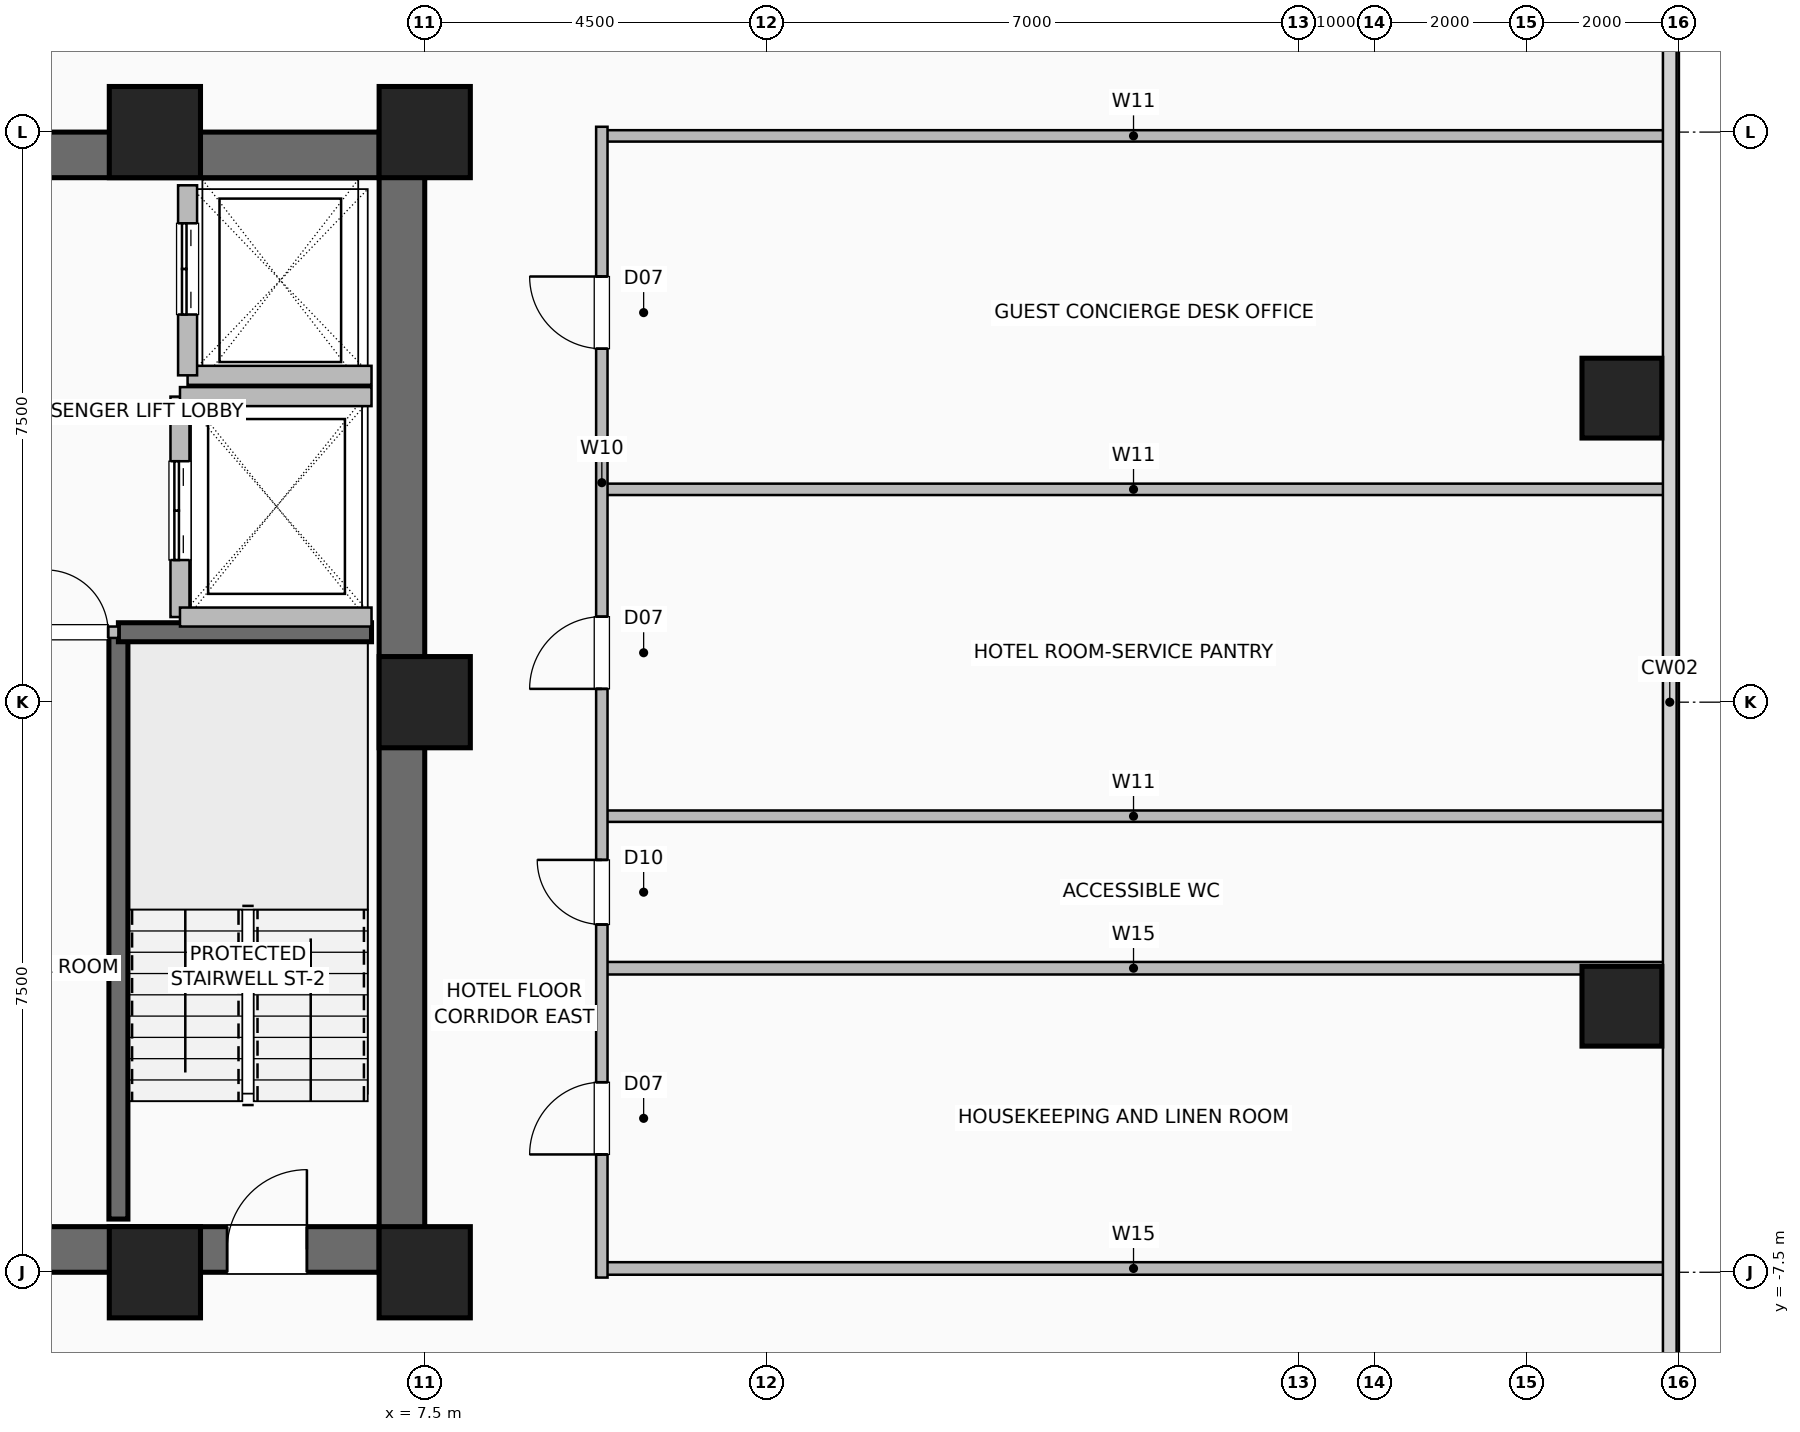
"""IFC4 building model, lengths in metres.
Left out: names, types, materials, properties, quantities, classifications, styles, units other than length and angle.
Written with IfcOpenShell. Run it as: python <this file> out.ifc"""

import sys

from ifc_helpers import new_model, si_unit, direction, frame, frame_2d, origin, origin_2d, place, context, subcontext, project, spatial, rectangle, hollow_rectangle, extrude, element, fill, save


model = new_model("IFC4")
c1 = context("Model", 3, precision=1e-05, world=origin(), true_north=direction((0.0, 1.0)))
c2 = subcontext(c1, "Body", "Model", "MODEL_VIEW")
j1 = project(units=[si_unit("LENGTHUNIT", "METRE"), si_unit("PLANEANGLEUNIT", "RADIAN")], contexts=[c1])
p1 = place(None, origin())
s1 = spatial("IfcSite", under=j1, at=p1, CompositionType="ELEMENT")
p2 = place(p1, origin())
s2 = spatial("IfcBuilding", under=s1, at=p2, CompositionType="ELEMENT")
p3 = place(p2, frame((0.0, 0.0, 34.0)))
s3 = spatial("IfcBuildingStorey", under=s2, at=p3, CompositionType="ELEMENT", Elevation=34.0)
for number, where, z_axis, x_axis in (
    (1, (3.95, -7.5, 0.0), (0.0, 0.0, 1.0), (1.0, 0.0, 0.0)),
    (2, (7.5, -7.5, 0.0), (0.0, 0.0, 1.0), (1.0, 0.0, 0.0)),
    (3, (7.5, 0.0, 0.0), (0.0, 0.0, 1.0), (1.0, 0.0, 0.0)),
    (4, (7.5, 7.5, 0.0), (0.0, 0.0, 1.0), (1.0, 0.0, 0.0)),
    (5, (3.95, 7.5, 0.0), (0.0, 0.0, 1.0), (1.0, 0.0, 0.0)),
):
    element("IfcColumn", number, at=place(p3, frame(where, z_axis=z_axis, x_axis=x_axis)), inside=s3, PredefinedType="COLUMN", context=c2, shape_type="SweptSolid", body=[
        extrude(hollow_rectangle(XDim=1.2, YDim=1.2, WallThickness=0.055, at=origin_2d()), origin(), (0.0, 0.0, 1.0), 3.5),
    ])
for number, where, z_axis, x_axis in (
    (6, (23.25, -4.0, 0.0), (0.0, 0.0, 1.0), (1.0, 0.0, 0.0)),
    (7, (23.25, 4.0, 0.0), (0.0, 0.0, 1.0), (1.0, 0.0, 0.0)),
):
    element("IfcColumn", number, at=place(p3, frame(where, z_axis=z_axis, x_axis=x_axis)), inside=s3, PredefinedType="COLUMN", context=c2, shape_type="SweptSolid", body=[
        extrude(hollow_rectangle(XDim=1.05, YDim=1.05, WallThickness=0.05, at=origin_2d()), origin(), (0.0, 0.0, 1.0), 3.5),
    ])
p4 = place(p3, frame((-7.5, -7.2, 0.0), z_axis=(0.0, 0.0, 1.0), x_axis=(1.0, 0.0, 0.0)))
e8 = element("IfcWall", 8, at=p4, inside=s3, PredefinedType="SHEAR", context=c2, shape_type="SweptSolid", body=[
    extrude(rectangle(XDim=15.0, YDim=0.6, at=frame_2d((7.5, 0.0))), origin(), (0.0, 0.0, 1.0), 3.25),
])
p5 = place(p4, frame((1.55, 0.0, 0.0)))
e9 = element("IfcOpeningElement", 9, at=p5, cuts=e8, PredefinedType="OPENING", context=c2, shape_type="SweptSolid", body=[
    extrude(rectangle(XDim=1.05, YDim=2.08, at=frame_2d((0.525, 1.04))), frame((0.0, 0.31, 0.0), z_axis=(0.0, -1.0, 0.0), x_axis=(1.0, 0.0, 0.0)), (0.0, 0.0, 1.0), 0.62),
])
p6 = place(p4, frame((12.4, 0.0, 0.0)))
e10 = element("IfcOpeningElement", 10, at=p6, cuts=e8, PredefinedType="OPENING", context=c2, shape_type="SweptSolid", body=[
    extrude(rectangle(XDim=1.05, YDim=2.08, at=frame_2d((0.525, 1.04))), frame((0.0, 0.31, 0.0), z_axis=(0.0, -1.0, 0.0), x_axis=(1.0, 0.0, 0.0)), (0.0, 0.0, 1.0), 0.62),
])
p7 = place(p4, frame((4.64, 0.0, 0.0)))
e11 = element("IfcOpeningElement", 11, at=p7, cuts=e8, PredefinedType="OPENING", context=c2, shape_type="SweptSolid", body=[
    extrude(rectangle(XDim=1.1, YDim=2.2, at=frame_2d((0.55, 1.1))), frame((0.0, 0.31, 0.0), z_axis=(0.0, -1.0, 0.0), x_axis=(1.0, 0.0, 0.0)), (0.0, 0.0, 1.0), 0.62),
])
p8 = place(p4, frame((6.52, 0.0, 0.0)))
e12 = element("IfcOpeningElement", 12, at=p8, cuts=e8, PredefinedType="OPENING", context=c2, shape_type="SweptSolid", body=[
    extrude(rectangle(XDim=1.1, YDim=2.2, at=frame_2d((0.55, 1.1))), frame((0.0, 0.31, 0.0), z_axis=(0.0, -1.0, 0.0), x_axis=(1.0, 0.0, 0.0)), (0.0, 0.0, 1.0), 0.62),
])
p9 = place(p4, frame((8.4, 0.0, 0.0)))
e13 = element("IfcOpeningElement", 13, at=p9, cuts=e8, PredefinedType="OPENING", context=c2, shape_type="SweptSolid", body=[
    extrude(rectangle(XDim=1.1, YDim=2.2, at=frame_2d((0.55, 1.1))), frame((0.0, 0.31, 0.0), z_axis=(0.0, -1.0, 0.0), x_axis=(1.0, 0.0, 0.0)), (0.0, 0.0, 1.0), 0.62),
])
for number, where, z_axis, x_axis in (
    (14, (-7.5, 7.2, 0.0), (0.0, 0.0, 1.0), (1.0, 0.0, 0.0)),
    (15, (7.2, -7.5, 0.0), (0.0, 0.0, 1.0), (0.0, 1.0, 0.0)),
):
    element("IfcWall", number, at=place(p3, frame(where, z_axis=z_axis, x_axis=x_axis)), inside=s3, PredefinedType="SHEAR", context=c2, shape_type="SweptSolid", body=[
        extrude(rectangle(XDim=15.0, YDim=0.6, at=frame_2d((7.5, 0.0))), origin(), (0.0, 0.0, 1.0), 3.25),
    ])
p10 = place(p3, frame((3.47, -6.8, 0.0), z_axis=(0.0, 0.0, 1.0), x_axis=(0.0, 1.0, 0.0)))
e16 = element("IfcWall", 16, at=p10, inside=s3, PredefinedType="SHEAR", context=c2, shape_type="SweptSolid", body=[
    extrude(rectangle(XDim=7.72, YDim=0.25, at=frame_2d((3.86, 0.0))), origin(), (0.0, 0.0, 1.0), 3.25),
])
p11 = place(p3, frame((3.47, 0.92, 0.0), z_axis=(0.0, 0.0, 1.0), x_axis=(1.0, 0.0, 0.0)))
e17 = element("IfcWall", 17, at=p11, inside=s3, PredefinedType="SHEAR", context=c2, shape_type="SweptSolid", body=[
    extrude(rectangle(XDim=3.33, YDim=0.25, at=frame_2d((1.665, 0.0))), origin(), (0.0, 0.0, 1.0), 3.25),
])
p12 = place(p3, frame((4.38, 4.3, 0.0), z_axis=(0.0, 0.0, 1.0), x_axis=(1.0, 0.0, 0.0)))
e18 = element("IfcWall", 18, at=p12, inside=s3, PredefinedType="SHEAR", context=c2, shape_type="SweptSolid", body=[
    extrude(rectangle(XDim=2.42, YDim=0.25, at=frame_2d((1.21, 0.0))), origin(), (0.0, 0.0, 1.0), 3.25),
])
p13 = place(p3, frame((4.38, 4.3, 0.0), z_axis=(0.0, 0.0, 1.0), x_axis=(0.0, 1.0, 0.0)))
e19 = element("IfcWall", 19, at=p13, inside=s3, PredefinedType="SHEAR", context=c2, shape_type="SweptSolid", body=[
    extrude(rectangle(XDim=2.5, YDim=0.25, at=frame_2d((1.25, 0.0))), origin(), (0.0, 0.0, 1.0), 3.25),
])
p14 = place(p13, frame((0.8, 0.0, 0.0)))
e20 = element("IfcOpeningElement", 20, at=p14, cuts=e19, PredefinedType="OPENING", context=c2, shape_type="SweptSolid", body=[
    extrude(rectangle(XDim=1.2, YDim=2.2, at=frame_2d((0.6, 1.1))), frame((0.0, 0.135, 0.0), z_axis=(0.0, -1.0, 0.0), x_axis=(1.0, 0.0, 0.0)), (0.0, 0.0, 1.0), 0.27),
])
p15 = place(p3, frame((4.28, 1.12, 0.0), z_axis=(0.0, 0.0, 1.0), x_axis=(0.0, 1.0, 0.0)))
e21 = element("IfcWall", 21, at=p15, inside=s3, PredefinedType="SHEAR", context=c2, shape_type="SweptSolid", body=[
    extrude(rectangle(XDim=2.9, YDim=0.25, at=frame_2d((1.45, 0.0))), origin(), (0.0, 0.0, 1.0), 3.25),
])
p16 = place(p15, frame((0.75, 0.0, 0.0)))
e22 = element("IfcOpeningElement", 22, at=p16, cuts=e21, PredefinedType="OPENING", context=c2, shape_type="SweptSolid", body=[
    extrude(rectangle(XDim=1.3, YDim=2.3, at=frame_2d((0.65, 1.15))), frame((0.0, 0.135, 0.0), z_axis=(0.0, -1.0, 0.0), x_axis=(1.0, 0.0, 0.0)), (0.0, 0.0, 1.0), 0.27),
])
for number, where, z_axis, x_axis in (
    (23, (4.28, 1.12, 0.0), (0.0, 0.0, 1.0), (1.0, 0.0, 0.0)),
    (24, (4.28, 4.02, 0.0), (0.0, 0.0, 1.0), (1.0, 0.0, 0.0)),
):
    element("IfcWall", number, at=place(p3, frame(where, z_axis=z_axis, x_axis=x_axis)), inside=s3, PredefinedType="SHEAR", context=c2, shape_type="SweptSolid", body=[
        extrude(rectangle(XDim=2.52, YDim=0.25, at=frame_2d((1.26, 0.0))), origin(), (0.0, 0.0, 1.0), 3.25),
    ])
p17 = place(p3, frame((2.38, 0.92, 0.0), z_axis=(0.0, 0.0, 1.0), x_axis=(1.0, 0.0, 0.0)))
e25 = element("IfcWall", 25, at=p17, inside=s3, PredefinedType="PARTITIONING", context=c2, shape_type="SweptSolid", body=[
    extrude(rectangle(XDim=1.09, YDim=0.15, at=frame_2d((0.545, 0.0))), origin(), (0.0, 0.0, 1.0), 3.25),
])
p18 = place(p17, frame((0.135, 0.0, 0.0)))
e26 = element("IfcOpeningElement", 26, at=p18, cuts=e25, PredefinedType="OPENING", context=c2, shape_type="SweptSolid", body=[
    extrude(rectangle(XDim=0.82, YDim=2.05, at=frame_2d((0.41, 1.025))), frame((0.0, 0.085, 0.0), z_axis=(0.0, -1.0, 0.0), x_axis=(1.0, 0.0, 0.0)), (0.0, 0.0, 1.0), 0.17),
])
for number, where, z_axis, x_axis in (
    (27, (9.83, -7.45, 0.0), (0.0, 0.0, 1.0), (1.0, 0.0, 0.0)),
    (28, (9.83, -3.5, 0.0), (0.0, 0.0, 1.0), (1.0, 0.0, 0.0)),
):
    element("IfcWall", number, at=place(p3, frame(where, z_axis=z_axis, x_axis=x_axis)), inside=s3, PredefinedType="PLUMBINGWALL", context=c2, shape_type="SweptSolid", body=[
        extrude(rectangle(XDim=13.99, YDim=0.165, at=frame_2d((6.995, 0.0))), origin(), (0.0, 0.0, 1.0), 3.25),
    ])
for number, where, z_axis, x_axis in (
    (29, (9.83, -1.5, 0.0), (0.0, 0.0, 1.0), (1.0, 0.0, 0.0)),
    (30, (9.83, 2.8, 0.0), (0.0, 0.0, 1.0), (1.0, 0.0, 0.0)),
    (31, (9.83, 7.45, 0.0), (0.0, 0.0, 1.0), (1.0, 0.0, 0.0)),
):
    element("IfcWall", number, at=place(p3, frame(where, z_axis=z_axis, x_axis=x_axis)), inside=s3, PredefinedType="PARTITIONING", context=c2, shape_type="SweptSolid", body=[
        extrude(rectangle(XDim=13.99, YDim=0.15, at=frame_2d((6.995, 0.0))), origin(), (0.0, 0.0, 1.0), 3.25),
    ])
p19 = place(p3, frame((9.83, -7.57, 0.0), z_axis=(0.0, 0.0, 1.0), x_axis=(0.0, 1.0, 0.0)))
e32 = element("IfcWall", 32, at=p19, inside=s3, PredefinedType="PARTITIONING", context=c2, shape_type="SweptSolid", body=[
    extrude(rectangle(XDim=15.14, YDim=0.15, at=frame_2d((7.57, 0.0))), origin(), (0.0, 0.0, 1.0), 3.25),
])
p20 = place(p19, frame((1.62, 0.0, 0.0)))
e33 = element("IfcOpeningElement", 33, at=p20, cuts=e32, PredefinedType="OPENING", context=c2, shape_type="SweptSolid", body=[
    extrude(rectangle(XDim=0.95, YDim=2.06, at=frame_2d((0.475, 1.03))), frame((0.0, 0.085, 0.0), z_axis=(0.0, -1.0, 0.0), x_axis=(1.0, 0.0, 0.0)), (0.0, 0.0, 1.0), 0.17),
])
p21 = place(p19, frame((4.645, 0.0, 0.0)))
e34 = element("IfcOpeningElement", 34, at=p21, cuts=e32, PredefinedType="OPENING", context=c2, shape_type="SweptSolid", body=[
    extrude(rectangle(XDim=0.85, YDim=2.05, at=frame_2d((0.425, 1.025))), frame((0.0, 0.085, 0.0), z_axis=(0.0, -1.0, 0.0), x_axis=(1.0, 0.0, 0.0)), (0.0, 0.0, 1.0), 0.17),
])
p22 = place(p19, frame((7.745, 0.0, 0.0)))
e35 = element("IfcOpeningElement", 35, at=p22, cuts=e32, PredefinedType="OPENING", context=c2, shape_type="SweptSolid", body=[
    extrude(rectangle(XDim=0.95, YDim=2.06, at=frame_2d((0.475, 1.03))), frame((0.0, 0.085, 0.0), z_axis=(0.0, -1.0, 0.0), x_axis=(1.0, 0.0, 0.0)), (0.0, 0.0, 1.0), 0.17),
])
p23 = place(p19, frame((12.22, 0.0, 0.0)))
e36 = element("IfcOpeningElement", 36, at=p23, cuts=e32, PredefinedType="OPENING", context=c2, shape_type="SweptSolid", body=[
    extrude(rectangle(XDim=0.95, YDim=2.06, at=frame_2d((0.475, 1.03))), frame((0.0, 0.085, 0.0), z_axis=(0.0, -1.0, 0.0), x_axis=(1.0, 0.0, 0.0)), (0.0, 0.0, 1.0), 0.17),
])
p24 = place(p6, origin())
e37 = element("IfcDoor", 37, at=p24, inside=s3, OperationType="SINGLE_SWING_RIGHT", PredefinedType="DOOR", context=c2, shape_type="SweptSolid", body=[
    extrude(rectangle(XDim=1.05, YDim=2.08, at=frame_2d((0.525, 1.04))), frame((0.0, 0.025, 0.0), z_axis=(0.0, -1.0, 0.0), x_axis=(1.0, 0.0, 0.0)), (0.0, 0.0, 1.0), 0.05),
])
fill(e10, e37)
p25 = place(p14, origin())
e38 = element("IfcDoor", 38, at=p25, inside=s3, OperationType="DOUBLE_DOOR_SLIDING", PredefinedType="DOOR", context=c2, shape_type="SweptSolid", body=[
    extrude(rectangle(XDim=1.2, YDim=2.2, at=frame_2d((0.6, 1.1))), frame((0.0, 0.025, 0.0), z_axis=(0.0, -1.0, 0.0), x_axis=(1.0, 0.0, 0.0)), (0.0, 0.0, 1.0), 0.05),
])
fill(e20, e38)
p26 = place(p16, origin())
e39 = element("IfcDoor", 39, at=p26, inside=s3, OperationType="DOUBLE_DOOR_SLIDING", PredefinedType="DOOR", context=c2, shape_type="SweptSolid", body=[
    extrude(rectangle(XDim=1.3, YDim=2.3, at=frame_2d((0.65, 1.15))), frame((0.0, 0.025, 0.0), z_axis=(0.0, -1.0, 0.0), x_axis=(1.0, 0.0, 0.0)), (0.0, 0.0, 1.0), 0.05),
])
fill(e22, e39)
p27 = place(p18, origin())
e40 = element("IfcDoor", 40, at=p27, inside=s3, OperationType="SINGLE_SWING_LEFT", PredefinedType="DOOR", context=c2, shape_type="SweptSolid", body=[
    extrude(rectangle(XDim=0.82, YDim=2.05, at=frame_2d((0.41, 1.025))), frame((0.0, 0.025, 0.0), z_axis=(0.0, -1.0, 0.0), x_axis=(1.0, 0.0, 0.0)), (0.0, 0.0, 1.0), 0.05),
])
fill(e26, e40)
p28 = place(p20, origin())
e41 = element("IfcDoor", 41, at=p28, inside=s3, OperationType="SINGLE_SWING_LEFT", PredefinedType="DOOR", context=c2, shape_type="SweptSolid", body=[
    extrude(rectangle(XDim=0.95, YDim=2.06, at=frame_2d((0.475, 1.03))), frame((0.0, 0.025, 0.0), z_axis=(0.0, -1.0, 0.0), x_axis=(1.0, 0.0, 0.0)), (0.0, 0.0, 1.0), 0.05),
])
fill(e33, e41)
p29 = place(p21, origin())
e42 = element("IfcDoor", 42, at=p29, inside=s3, OperationType="SINGLE_SWING_RIGHT", PredefinedType="DOOR", context=c2, shape_type="SweptSolid", body=[
    extrude(rectangle(XDim=0.85, YDim=2.05, at=frame_2d((0.425, 1.025))), frame((0.0, 0.025, 0.0), z_axis=(0.0, -1.0, 0.0), x_axis=(1.0, 0.0, 0.0)), (0.0, 0.0, 1.0), 0.05),
])
fill(e34, e42)
p30 = place(p22, origin())
e43 = element("IfcDoor", 43, at=p30, inside=s3, OperationType="SINGLE_SWING_LEFT", PredefinedType="DOOR", context=c2, shape_type="SweptSolid", body=[
    extrude(rectangle(XDim=0.95, YDim=2.06, at=frame_2d((0.475, 1.03))), frame((0.0, 0.025, 0.0), z_axis=(0.0, -1.0, 0.0), x_axis=(1.0, 0.0, 0.0)), (0.0, 0.0, 1.0), 0.05),
])
fill(e35, e43)
p31 = place(p23, origin())
e44 = element("IfcDoor", 44, at=p31, inside=s3, OperationType="SINGLE_SWING_RIGHT", PredefinedType="DOOR", context=c2, shape_type="SweptSolid", body=[
    extrude(rectangle(XDim=0.95, YDim=2.06, at=frame_2d((0.475, 1.03))), frame((0.0, 0.025, 0.0), z_axis=(0.0, -1.0, 0.0), x_axis=(1.0, 0.0, 0.0)), (0.0, 0.0, 1.0), 0.05),
])
fill(e36, e44)
save(model, sys.argv[1])
